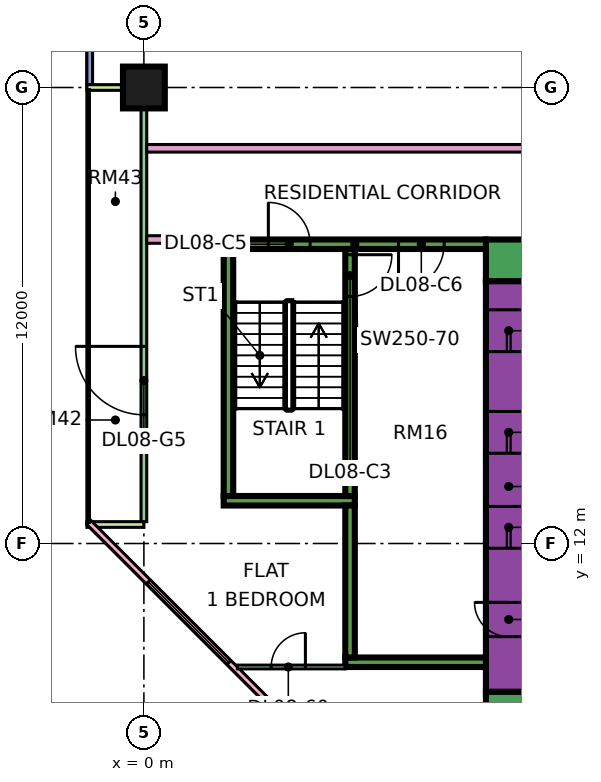
"""IFC4 building model, lengths in metres.
Left out: names, types, materials, properties, quantities, classifications, styles, units other than length and angle.
Written with IfcOpenShell. Run it as: python <this file> out.ifc"""

import sys

from ifc_helpers import new_model, si_unit, direction, frame, frame_2d, origin, origin_2d, place, context, subcontext, project, spatial, rectangle, extrude, element, fill, save


model = new_model("IFC4")
c1 = context("Model", 3, precision=1e-05, world=origin(), true_north=direction((0.0, 1.0)))
c2 = subcontext(c1, "Body", "Model", "MODEL_VIEW")
j1 = project(units=[si_unit("LENGTHUNIT", "METRE"), si_unit("PLANEANGLEUNIT", "RADIAN")], contexts=[c1])
p1 = place(None, origin())
s1 = spatial("IfcSite", under=j1, at=p1, CompositionType="ELEMENT")
p2 = place(p1, origin())
s2 = spatial("IfcBuilding", under=s1, at=p2, CompositionType="ELEMENT")
p3 = place(p2, frame((0.0, 0.0, 45.15)))
s3 = spatial("IfcBuildingStorey", under=s2, at=p3, CompositionType="ELEMENT", Elevation=45.15)
p4 = place(p3, frame((0.0, 24.0, 0.0), z_axis=(0.0, 0.0, 1.0), x_axis=(1.0, 0.0, 0.0)))
e1 = element("IfcColumn", 1, at=p4, inside=s3, PredefinedType="COLUMN", context=c2, shape_type="SweptSolid", body=[
    extrude(rectangle(XDim=1.1, YDim=1.1, at=origin_2d()), origin(), (0.0, 0.0, 1.0), 3.75),
])
p5 = place(p3, frame((9.0, 7.55, 0.0), z_axis=(0.0, 0.0, 1.0), x_axis=(1.0, 0.0, 0.0)))
e2 = element("IfcWall", 2, at=p5, inside=s3, PredefinedType="SHEAR", context=c2, shape_type="SweptSolid", body=[
    extrude(rectangle(XDim=25.0, YDim=1.1, at=frame_2d((12.5, 0.0))), origin(), (0.0, 0.0, 1.0), 3.75),
])
p6 = place(p3, frame((9.0, 19.45, 0.0), z_axis=(0.0, 0.0, 1.0), x_axis=(1.0, 0.0, 0.0)))
e3 = element("IfcWall", 3, at=p6, inside=s3, PredefinedType="SHEAR", context=c2, shape_type="SweptSolid", body=[
    extrude(rectangle(XDim=25.0, YDim=1.1, at=frame_2d((12.5, 0.0))), origin(), (0.0, 0.0, 1.0), 3.75),
])
p7 = place(p6, frame((19.1, 0.0, 0.0)))
e4 = element("IfcOpeningElement", 4, at=p7, cuts=e3, PredefinedType="OPENING", context=c2, shape_type="SweptSolid", body=[
    extrude(rectangle(XDim=1.8, YDim=2.4, at=frame_2d((0.9, 1.2))), frame((0.0, 0.56, 0.0), z_axis=(0.0, -1.0, 0.0), x_axis=(1.0, 0.0, 0.0)), (0.0, 0.0, 1.0), 1.12),
])
p8 = place(p3, frame((9.6, 8.1, 0.0), z_axis=(0.0, 0.0, 1.0), x_axis=(0.0, 1.0, 0.0)))
e5 = element("IfcWall", 5, at=p8, inside=s3, PredefinedType="SHEAR", context=c2, shape_type="SweptSolid", body=[
    extrude(rectangle(XDim=10.8, YDim=1.2, at=frame_2d((5.4, 0.0))), origin(), (0.0, 0.0, 1.0), 3.75),
])
p9 = place(p8, frame((3.775, 0.0, 0.0)))
e6 = element("IfcOpeningElement", 6, at=p9, cuts=e5, PredefinedType="OPENING", context=c2, shape_type="SweptSolid", body=[
    extrude(rectangle(XDim=1.1, YDim=2.2, at=frame_2d((0.55, 1.1))), frame((0.0, 0.61, 0.0), z_axis=(0.0, -1.0, 0.0), x_axis=(1.0, 0.0, 0.0)), (0.0, 0.0, 1.0), 1.22),
])
p10 = place(p8, frame((6.275, 0.0, 0.0)))
e7 = element("IfcOpeningElement", 7, at=p10, cuts=e5, PredefinedType="OPENING", context=c2, shape_type="SweptSolid", body=[
    extrude(rectangle(XDim=1.1, YDim=2.2, at=frame_2d((0.55, 1.1))), frame((0.0, 0.61, 0.0), z_axis=(0.0, -1.0, 0.0), x_axis=(1.0, 0.0, 0.0)), (0.0, 0.0, 1.0), 1.22),
])
p11 = place(p8, frame((8.95, 0.0, 0.0)))
e8 = element("IfcOpeningElement", 8, at=p11, cuts=e5, PredefinedType="OPENING", context=c2, shape_type="SweptSolid", body=[
    extrude(rectangle(XDim=1.1, YDim=2.2, at=frame_2d((0.55, 1.1))), frame((0.0, 0.61, 0.0), z_axis=(0.0, -1.0, 0.0), x_axis=(1.0, 0.0, 0.0)), (0.0, 0.0, 1.0), 1.22),
])
p12 = place(p8, frame((1.45, 0.0, 0.0)))
e9 = element("IfcOpeningElement", 9, at=p12, cuts=e5, PredefinedType="OPENING", context=c2, shape_type="SweptSolid", body=[
    extrude(rectangle(XDim=0.9, YDim=2.1, at=frame_2d((0.45, 1.05))), frame((0.0, 0.61, 0.0), z_axis=(0.0, -1.0, 0.0), x_axis=(1.0, 0.0, 0.0)), (0.0, 0.0, 1.0), 1.22),
])
p13 = place(p3, frame((2.1, 19.875, 0.0), z_axis=(0.0, 0.0, 1.0), x_axis=(1.0, 0.0, 0.0)))
e10 = element("IfcWall", 10, at=p13, inside=s3, PredefinedType="SHEAR", context=c2, shape_type="SweptSolid", body=[
    extrude(rectangle(XDim=6.9, YDim=0.25, at=frame_2d((3.45, 0.0))), origin(), (0.0, 0.0, 1.0), 3.75),
])
p14 = place(p13, frame((1.175, 0.0, 0.0)))
e11 = element("IfcOpeningElement", 11, at=p14, cuts=e10, PredefinedType="OPENING", context=c2, shape_type="SweptSolid", body=[
    extrude(rectangle(XDim=1.1, YDim=2.2, at=frame_2d((0.55, 1.1))), frame((0.0, 0.135, 0.0), z_axis=(0.0, -1.0, 0.0), x_axis=(1.0, 0.0, 0.0)), (0.0, 0.0, 1.0), 0.27),
])
p15 = place(p13, frame((4.6, 0.0, 0.0)))
e12 = element("IfcOpeningElement", 12, at=p15, cuts=e10, PredefinedType="OPENING", context=c2, shape_type="SweptSolid", body=[
    extrude(rectangle(XDim=1.2, YDim=2.2, at=frame_2d((0.6, 1.1))), frame((0.0, 0.135, 0.0), z_axis=(0.0, -1.0, 0.0), x_axis=(1.0, 0.0, 0.0)), (0.0, 0.0, 1.0), 0.27),
])
p16 = place(p3, frame((2.1, 13.125, 0.0), z_axis=(0.0, 0.0, 1.0), x_axis=(1.0, 0.0, 0.0)))
e13 = element("IfcWall", 13, at=p16, inside=s3, PredefinedType="SHEAR", context=c2, shape_type="SweptSolid", body=[
    extrude(rectangle(XDim=3.45, YDim=0.25, at=frame_2d((1.725, 0.0))), origin(), (0.0, 0.0, 1.0), 3.75),
])
p17 = place(p3, frame((2.225, 13.25, 0.0), z_axis=(0.0, 0.0, 1.0), x_axis=(0.0, 1.0, 0.0)))
e14 = element("IfcWall", 14, at=p17, inside=s3, PredefinedType="SHEAR", context=c2, shape_type="SweptSolid", body=[
    extrude(rectangle(XDim=6.5, YDim=0.25, at=frame_2d((3.25, 0.0))), origin(), (0.0, 0.0, 1.0), 3.75),
])
p18 = place(p3, frame((5.425, 13.25, 0.0), z_axis=(0.0, 0.0, 1.0), x_axis=(0.0, 1.0, 0.0)))
e15 = element("IfcWall", 15, at=p18, inside=s3, PredefinedType="SHEAR", context=c2, shape_type="SweptSolid", body=[
    extrude(rectangle(XDim=6.5, YDim=0.25, at=frame_2d((3.25, 0.0))), origin(), (0.0, 0.0, 1.0), 3.75),
])
p19 = place(p18, frame((5.25, 0.0, 0.0)))
e16 = element("IfcOpeningElement", 16, at=p19, cuts=e15, PredefinedType="OPENING", context=c2, shape_type="SweptSolid", body=[
    extrude(rectangle(XDim=1.1, YDim=2.2, at=frame_2d((0.55, 1.1))), frame((0.0, 0.135, 0.0), z_axis=(0.0, -1.0, 0.0), x_axis=(1.0, 0.0, 0.0)), (0.0, 0.0, 1.0), 0.27),
])
p20 = place(p3, frame((5.3, 8.875, 0.0), z_axis=(0.0, 0.0, 1.0), x_axis=(1.0, 0.0, 0.0)))
e17 = element("IfcWall", 17, at=p20, inside=s3, PredefinedType="SHEAR", context=c2, shape_type="SweptSolid", body=[
    extrude(rectangle(XDim=3.7, YDim=0.25, at=frame_2d((1.85, 0.0))), origin(), (0.0, 0.0, 1.0), 3.75),
])
p21 = place(p3, frame((5.425, 9.0, 0.0), z_axis=(0.0, 0.0, 1.0), x_axis=(0.0, 1.0, 0.0)))
e18 = element("IfcWall", 18, at=p21, inside=s3, PredefinedType="SHEAR", context=c2, shape_type="SweptSolid", body=[
    extrude(rectangle(XDim=4.0, YDim=0.25, at=frame_2d((2.0, 0.0))), origin(), (0.0, 0.0, 1.0), 3.75),
])
p22 = place(p3, frame((-1.425, 35.925, 0.0), z_axis=(0.0, 0.0, 1.0), x_axis=(0.0, -1.0, 0.0)))
e19 = element("IfcWall", 19, at=p22, inside=s3, PredefinedType="SOLIDWALL", context=c2, shape_type="SweptSolid", body=[
    extrude(rectangle(XDim=11.85, YDim=0.15, at=frame_2d((5.925, 0.0))), origin(), (0.0, 0.0, 1.0), 3.35),
])
p23 = place(p22, frame((0.562, 0.0, 0.45)))
e20 = element("IfcOpeningElement", 20, at=p23, cuts=e19, PredefinedType="OPENING", context=c2, shape_type="SweptSolid", body=[
    extrude(rectangle(XDim=1.8, YDim=2.4, at=frame_2d((0.9, 1.2))), frame((0.0, 0.085, 0.0), z_axis=(0.0, -1.0, 0.0), x_axis=(1.0, 0.0, 0.0)), (0.0, 0.0, 1.0), 0.17),
])
p24 = place(p22, frame((3.525, 0.0, 0.45)))
e21 = element("IfcOpeningElement", 21, at=p24, cuts=e19, PredefinedType="OPENING", context=c2, shape_type="SweptSolid", body=[
    extrude(rectangle(XDim=1.8, YDim=2.4, at=frame_2d((0.9, 1.2))), frame((0.0, 0.085, 0.0), z_axis=(0.0, -1.0, 0.0), x_axis=(1.0, 0.0, 0.0)), (0.0, 0.0, 1.0), 0.17),
])
p25 = place(p22, frame((7.387, 0.0, 0.45)))
e22 = element("IfcOpeningElement", 22, at=p25, cuts=e19, PredefinedType="OPENING", context=c2, shape_type="SweptSolid", body=[
    extrude(rectangle(XDim=3.0, YDim=2.4, at=frame_2d((1.5, 1.2))), frame((0.0, 0.085, 0.0), z_axis=(0.0, -1.0, 0.0), x_axis=(1.0, 0.0, 0.0)), (0.0, 0.0, 1.0), 0.17),
])
p26 = place(p3, frame((0.0, 23.925, 0.0), z_axis=(0.0, 0.0, 1.0), x_axis=(0.0, -1.0, 0.0)))
e23 = element("IfcWall", 23, at=p26, inside=s3, PredefinedType="SOLIDWALL", context=c2, shape_type="SweptSolid", body=[
    extrude(rectangle(XDim=11.35, YDim=0.15, at=frame_2d((5.675, 0.0))), origin(), (0.0, 0.0, 1.0), 3.35),
])
p27 = place(p26, frame((6.738, 0.0, 0.0)))
e24 = element("IfcOpeningElement", 24, at=p27, cuts=e23, PredefinedType="OPENING", context=c2, shape_type="SweptSolid", body=[
    extrude(rectangle(XDim=1.8, YDim=2.4, at=frame_2d((0.9, 1.2))), frame((0.0, 0.085, 0.0), z_axis=(0.0, -1.0, 0.0), x_axis=(1.0, 0.0, 0.0)), (0.0, 0.0, 1.0), 0.17),
])
for number, where, z_axis, x_axis in (
    (25, (-1.5, 24.0, 0.0), (0.0, 0.0, 1.0), (1.0, 0.0, 0.0)),
    (26, (-1.5, 12.5, 0.0), (0.0, 0.0, 1.0), (1.0, 0.0, 0.0)),
):
    element("IfcWall", number, at=place(p3, frame(where, z_axis=z_axis, x_axis=x_axis)), inside=s3, PredefinedType="SOLIDWALL", context=c2, shape_type="SweptSolid", body=[
        extrude(rectangle(XDim=1.5, YDim=0.15, at=frame_2d((0.75, 0.0))), origin(), (0.0, 0.0, 1.0), 3.35),
    ])
p28 = place(p3, frame((-1.447, 12.553, 0.0), z_axis=(0.0, 0.0, 1.0), x_axis=(0.707106781187, -0.707106781187, 0.0)))
e27 = element("IfcWall", 27, at=p28, inside=s3, PredefinedType="SOLIDWALL", context=c2, shape_type="SweptSolid", body=[
    extrude(rectangle(XDim=19.799, YDim=0.15, at=frame_2d((9.899, 0.0))), origin(), (0.0, 0.0, 1.0), 3.35),
])
p29 = place(p28, frame((2.212, 0.0, 0.45)))
e28 = element("IfcOpeningElement", 28, at=p29, cuts=e27, PredefinedType="OPENING", context=c2, shape_type="SweptSolid", body=[
    extrude(rectangle(XDim=3.0, YDim=2.4, at=frame_2d((1.5, 1.2))), frame((0.0, 0.085, 0.0), z_axis=(0.0, -1.0, 0.0), x_axis=(1.0, 0.0, 0.0)), (0.0, 0.0, 1.0), 0.17),
])
p30 = place(p28, frame((10.216, 0.0, 0.45)))
e29 = element("IfcOpeningElement", 29, at=p30, cuts=e27, PredefinedType="OPENING", context=c2, shape_type="SweptSolid", body=[
    extrude(rectangle(XDim=3.0, YDim=2.4, at=frame_2d((1.5, 1.2))), frame((0.0, 0.085, 0.0), z_axis=(0.0, -1.0, 0.0), x_axis=(1.0, 0.0, 0.0)), (0.0, 0.0, 1.0), 0.17),
])
p31 = place(p3, frame((0.074, 20.0, 0.0), z_axis=(0.0, 0.0, 1.0), x_axis=(1.0, 0.0, 0.0)))
e30 = element("IfcWall", 30, at=p31, inside=s3, PredefinedType="PARTITIONING", context=c2, shape_type="SweptSolid", body=[
    extrude(rectangle(XDim=2.026, YDim=0.2, at=frame_2d((1.013, 0.0))), origin(), (0.0, 0.0, 1.0), 3.35),
])
p32 = place(p3, frame((0.074, 22.4, 0.0), z_axis=(0.0, 0.0, 1.0), x_axis=(1.0, 0.0, 0.0)))
e31 = element("IfcWall", 31, at=p32, inside=s3, PredefinedType="PARTITIONING", context=c2, shape_type="SweptSolid", body=[
    extrude(rectangle(XDim=12.376, YDim=0.2, at=frame_2d((6.188, 0.0))), origin(), (0.0, 0.0, 1.0), 3.35),
])
p33 = place(p3, frame((2.461, 8.75, 0.0), z_axis=(0.0, 0.0, 1.0), x_axis=(1.0, 0.0, 0.0)))
e32 = element("IfcWall", 32, at=p33, inside=s3, PredefinedType="PARTITIONING", context=c2, shape_type="SweptSolid", body=[
    extrude(rectangle(XDim=2.839, YDim=0.1, at=frame_2d((1.419, 0.0))), origin(), (0.0, 0.0, 1.0), 3.35),
])
p34 = place(p33, frame((0.889, 0.0, 0.0)))
e33 = element("IfcOpeningElement", 33, at=p34, cuts=e32, PredefinedType="OPENING", context=c2, shape_type="SweptSolid", body=[
    extrude(rectangle(XDim=0.9, YDim=2.1, at=frame_2d((0.45, 1.05))), frame((0.0, 0.06, 0.0), z_axis=(0.0, -1.0, 0.0), x_axis=(1.0, 0.0, 0.0)), (0.0, 0.0, 1.0), 0.12),
])
p35 = place(p27, frame((1.8, 0.0, 0.0), z_axis=(0.0, 0.0, 1.0), x_axis=(-1.0, 0.0, 0.0)))
e34 = element("IfcDoor", 34, at=p35, inside=s3, OperationType="DOUBLE_DOOR_SINGLE_SWING", PredefinedType="DOOR", context=c2, shape_type="SweptSolid", body=[
    extrude(rectangle(XDim=1.8, YDim=2.4, at=frame_2d((0.9, 1.2))), frame((0.0, 0.025, 0.0), z_axis=(0.0, -1.0, 0.0), x_axis=(1.0, 0.0, 0.0)), (0.0, 0.0, 1.0), 0.05),
])
fill(e24, e34)
p36 = place(p29, origin())
e35 = element("IfcWindow", 35, at=p36, inside=s3, PartitioningType="SINGLE_PANEL", PredefinedType="WINDOW", context=c2, shape_type="SweptSolid", body=[
    extrude(rectangle(XDim=3.0, YDim=2.4, at=frame_2d((1.5, 1.2))), frame((0.0, 0.03, 0.0), z_axis=(0.0, -1.0, 0.0), x_axis=(1.0, 0.0, 0.0)), (0.0, 0.0, 1.0), 0.06),
])
fill(e28, e35)
p37 = place(p9, origin())
e36 = element("IfcDoor", 36, at=p37, inside=s3, OperationType="DOUBLE_DOOR_SLIDING", PredefinedType="DOOR", context=c2, shape_type="SweptSolid", body=[
    extrude(rectangle(XDim=1.1, YDim=2.2, at=frame_2d((0.55, 1.1))), frame((0.0, 0.025, 0.0), z_axis=(0.0, -1.0, 0.0), x_axis=(1.0, 0.0, 0.0)), (0.0, 0.0, 1.0), 0.05),
])
fill(e6, e36)
p38 = place(p10, origin())
e37 = element("IfcDoor", 37, at=p38, inside=s3, OperationType="DOUBLE_DOOR_SLIDING", PredefinedType="DOOR", context=c2, shape_type="SweptSolid", body=[
    extrude(rectangle(XDim=1.1, YDim=2.2, at=frame_2d((0.55, 1.1))), frame((0.0, 0.025, 0.0), z_axis=(0.0, -1.0, 0.0), x_axis=(1.0, 0.0, 0.0)), (0.0, 0.0, 1.0), 0.05),
])
fill(e7, e37)
p39 = place(p11, origin())
e38 = element("IfcDoor", 38, at=p39, inside=s3, OperationType="DOUBLE_DOOR_SLIDING", PredefinedType="DOOR", context=c2, shape_type="SweptSolid", body=[
    extrude(rectangle(XDim=1.1, YDim=2.2, at=frame_2d((0.55, 1.1))), frame((0.0, 0.025, 0.0), z_axis=(0.0, -1.0, 0.0), x_axis=(1.0, 0.0, 0.0)), (0.0, 0.0, 1.0), 0.05),
])
fill(e8, e38)
p40 = place(p19, origin())
e39 = element("IfcDoor", 39, at=p40, inside=s3, OperationType="SINGLE_SWING_RIGHT", PredefinedType="DOOR", context=c2, shape_type="SweptSolid", body=[
    extrude(rectangle(XDim=1.1, YDim=2.2, at=frame_2d((0.55, 1.1))), frame((0.0, 0.025, 0.0), z_axis=(0.0, -1.0, 0.0), x_axis=(1.0, 0.0, 0.0)), (0.0, 0.0, 1.0), 0.05),
])
fill(e16, e39)
p41 = place(p12, frame((0.9, 0.0, 0.0), z_axis=(0.0, 0.0, 1.0), x_axis=(-1.0, 0.0, 0.0)))
e40 = element("IfcDoor", 40, at=p41, inside=s3, OperationType="SINGLE_SWING_RIGHT", PredefinedType="DOOR", context=c2, shape_type="SweptSolid", body=[
    extrude(rectangle(XDim=0.9, YDim=2.1, at=frame_2d((0.45, 1.05))), frame((0.0, 0.025, 0.0), z_axis=(0.0, -1.0, 0.0), x_axis=(1.0, 0.0, 0.0)), (0.0, 0.0, 1.0), 0.05),
])
fill(e9, e40)
p42 = place(p14, origin())
e41 = element("IfcDoor", 41, at=p42, inside=s3, OperationType="SINGLE_SWING_LEFT", PredefinedType="DOOR", context=c2, shape_type="SweptSolid", body=[
    extrude(rectangle(XDim=1.1, YDim=2.2, at=frame_2d((0.55, 1.1))), frame((0.0, 0.025, 0.0), z_axis=(0.0, -1.0, 0.0), x_axis=(1.0, 0.0, 0.0)), (0.0, 0.0, 1.0), 0.05),
])
fill(e11, e41)
p43 = place(p15, frame((1.2, 0.0, 0.0), z_axis=(0.0, 0.0, 1.0), x_axis=(-1.0, 0.0, 0.0)))
e42 = element("IfcDoor", 42, at=p43, inside=s3, OperationType="SINGLE_SWING_LEFT", PredefinedType="DOOR", context=c2, shape_type="SweptSolid", body=[
    extrude(rectangle(XDim=1.2, YDim=2.2, at=frame_2d((0.6, 1.1))), frame((0.0, 0.025, 0.0), z_axis=(0.0, -1.0, 0.0), x_axis=(1.0, 0.0, 0.0)), (0.0, 0.0, 1.0), 0.05),
])
fill(e12, e42)
p44 = place(p34, frame((0.9, 0.0, 0.0), z_axis=(0.0, 0.0, 1.0), x_axis=(-1.0, 0.0, 0.0)))
e43 = element("IfcDoor", 43, at=p44, inside=s3, OperationType="SINGLE_SWING_RIGHT", PredefinedType="DOOR", context=c2, shape_type="SweptSolid", body=[
    extrude(rectangle(XDim=0.9, YDim=2.1, at=frame_2d((0.45, 1.05))), frame((0.0, 0.025, 0.0), z_axis=(0.0, -1.0, 0.0), x_axis=(1.0, 0.0, 0.0)), (0.0, 0.0, 1.0), 0.05),
])
fill(e33, e43)
save(model, sys.argv[1])
